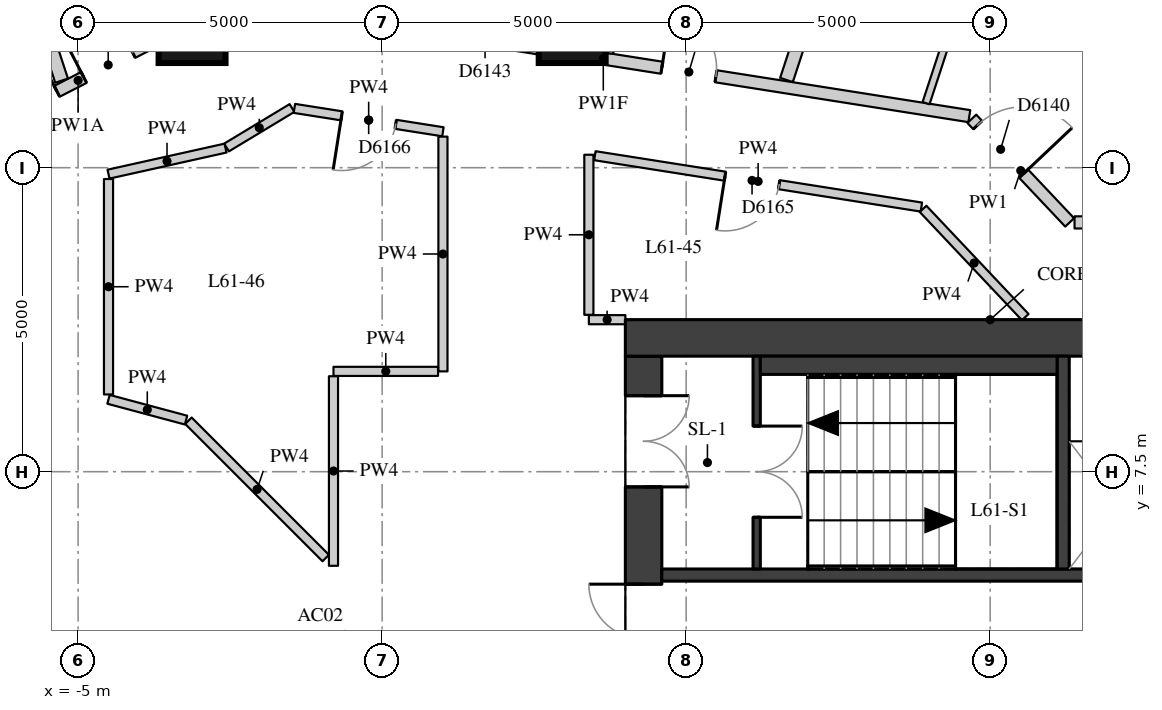
"""IFC4 building model, lengths in metres.
Left out: names, types, materials, properties, quantities, classifications, styles, units other than length and angle.
Written with IfcOpenShell. Run it as: python <this file> out.ifc"""

import sys

from ifc_helpers import new_model, si_unit, direction, frame, frame_2d, origin, origin_2d, place, context, subcontext, project, spatial, rectangle, extrude, element, fill, save


model = new_model("IFC4")
c1 = context("Model", 3, precision=1e-05, world=origin(), true_north=direction((0.0, 1.0)))
c2 = subcontext(c1, "Body", "Model", "MODEL_VIEW")
j1 = project(units=[si_unit("LENGTHUNIT", "METRE"), si_unit("PLANEANGLEUNIT", "RADIAN")], contexts=[c1])
p1 = place(None, origin())
s1 = spatial("IfcSite", under=j1, at=p1, CompositionType="ELEMENT")
p2 = place(p1, origin())
s2 = spatial("IfcBuilding", under=s1, at=p2, CompositionType="ELEMENT")
p3 = place(p2, frame((0.0, 0.0, 215.6)))
s3 = spatial("IfcBuildingStorey", under=s2, at=p3, CompositionType="ELEMENT", Elevation=215.6)
for number, where, z_axis, x_axis in (
    (1, (3.126, 14.772, 0.0), (0.0, 0.0, 1.0), (1.0, 0.0, 0.0)),
    (2, (-3.126, 14.772, 0.0), (0.0, 0.0, 1.0), (1.0, 0.0, 0.0)),
):
    element("IfcColumn", number, at=place(p3, frame(where, z_axis=z_axis, x_axis=x_axis)), inside=s3, PredefinedType="COLUMN", context=c2, shape_type="SweptSolid", body=[
        extrude(rectangle(XDim=1.1, YDim=1.1, at=origin_2d()), origin(), (0.0, 0.0, 1.0), 3.3),
    ])
p4 = place(p3, frame((4.3, -9.4, 0.0), z_axis=(0.0, 0.0, 1.0), x_axis=(0.0, 1.0, 0.0)))
e3 = element("IfcWall", 3, at=p4, inside=s3, PredefinedType="SHEAR", context=c2, shape_type="SweptSolid", body=[
    extrude(rectangle(XDim=18.8, YDim=0.6, at=frame_2d((9.4, 0.0))), origin(), (0.0, 0.0, 1.0), 3.02),
])
p5 = place(p4, frame((0.65, 0.0, 0.0)))
e4 = element("IfcOpeningElement", 4, at=p5, cuts=e3, PredefinedType="OPENING", context=c2, shape_type="SweptSolid", body=[
    extrude(rectangle(XDim=1.5, YDim=2.1, at=frame_2d((0.75, 1.05))), frame((0.0, 0.31, 0.0), z_axis=(0.0, -1.0, 0.0), x_axis=(1.0, 0.0, 0.0)), (0.0, 0.0, 1.0), 0.62),
])
p6 = place(p4, frame((3.75, 0.0, 0.0)))
e5 = element("IfcOpeningElement", 5, at=p6, cuts=e3, PredefinedType="OPENING", context=c2, shape_type="SweptSolid", body=[
    extrude(rectangle(XDim=1.8, YDim=2.1, at=frame_2d((0.9, 1.05))), frame((0.0, 0.31, 0.0), z_axis=(0.0, -1.0, 0.0), x_axis=(1.0, 0.0, 0.0)), (0.0, 0.0, 1.0), 0.62),
])
p7 = place(p4, frame((6.25, 0.0, 0.0)))
e6 = element("IfcOpeningElement", 6, at=p7, cuts=e3, PredefinedType="OPENING", context=c2, shape_type="SweptSolid", body=[
    extrude(rectangle(XDim=1.1, YDim=2.1, at=frame_2d((0.55, 1.05))), frame((0.0, 0.31, 0.0), z_axis=(0.0, -1.0, 0.0), x_axis=(1.0, 0.0, 0.0)), (0.0, 0.0, 1.0), 0.62),
])
p8 = place(p4, frame((8.9, 0.0, 0.0)))
e7 = element("IfcOpeningElement", 7, at=p8, cuts=e3, PredefinedType="OPENING", context=c2, shape_type="SweptSolid", body=[
    extrude(rectangle(XDim=1.0, YDim=2.1, at=frame_2d((0.5, 1.05))), frame((0.0, 0.31, 0.0), z_axis=(0.0, -1.0, 0.0), x_axis=(1.0, 0.0, 0.0)), (0.0, 0.0, 1.0), 0.62),
])
p9 = place(p4, frame((11.45, 0.0, 0.0)))
e8 = element("IfcOpeningElement", 8, at=p9, cuts=e3, PredefinedType="OPENING", context=c2, shape_type="SweptSolid", body=[
    extrude(rectangle(XDim=1.1, YDim=2.1, at=frame_2d((0.55, 1.05))), frame((0.0, 0.31, 0.0), z_axis=(0.0, -1.0, 0.0), x_axis=(1.0, 0.0, 0.0)), (0.0, 0.0, 1.0), 0.62),
])
p10 = place(p4, frame((13.25, 0.0, 0.0)))
e9 = element("IfcOpeningElement", 9, at=p10, cuts=e3, PredefinedType="OPENING", context=c2, shape_type="SweptSolid", body=[
    extrude(rectangle(XDim=1.8, YDim=2.1, at=frame_2d((0.9, 1.05))), frame((0.0, 0.31, 0.0), z_axis=(0.0, -1.0, 0.0), x_axis=(1.0, 0.0, 0.0)), (0.0, 0.0, 1.0), 0.62),
])
p11 = place(p4, frame((16.65, 0.0, 0.0)))
e10 = element("IfcOpeningElement", 10, at=p11, cuts=e3, PredefinedType="OPENING", context=c2, shape_type="SweptSolid", body=[
    extrude(rectangle(XDim=1.5, YDim=2.1, at=frame_2d((0.75, 1.05))), frame((0.0, 0.31, 0.0), z_axis=(0.0, -1.0, 0.0), x_axis=(1.0, 0.0, 0.0)), (0.0, 0.0, 1.0), 0.62),
])
p12 = place(p3, frame((4.0, 9.7, 0.0), z_axis=(0.0, 0.0, 1.0), x_axis=(1.0, 0.0, 0.0)))
e11 = element("IfcWall", 11, at=p12, inside=s3, PredefinedType="SHEAR", context=c2, shape_type="SweptSolid", body=[
    extrude(rectangle(XDim=12.0, YDim=0.6, at=frame_2d((6.0, 0.0))), origin(), (0.0, 0.0, 1.0), 3.02),
])
p13 = place(p3, frame((4.6, 5.8, 0.0), z_axis=(0.0, 0.0, 1.0), x_axis=(1.0, 0.0, 0.0)))
e12 = element("IfcWall", 12, at=p13, inside=s3, PredefinedType="SHEAR", context=c2, shape_type="SweptSolid", body=[
    extrude(rectangle(XDim=10.8, YDim=0.2, at=frame_2d((5.4, 0.0))), origin(), (0.0, 0.0, 1.0), 3.02),
])
p14 = place(p13, frame((7.05, 0.0, 0.0)))
e13 = element("IfcOpeningElement", 13, at=p14, cuts=e12, PredefinedType="OPENING", context=c2, shape_type="SweptSolid", body=[
    extrude(rectangle(XDim=1.1, YDim=2.1, at=frame_2d((0.55, 1.05))), frame((0.0, 0.11, 0.0), z_axis=(0.0, -1.0, 0.0), x_axis=(1.0, 0.0, 0.0)), (0.0, 0.0, 1.0), 0.22),
])
p15 = place(p13, frame((9.05, 0.0, 0.0)))
e14 = element("IfcOpeningElement", 14, at=p15, cuts=e12, PredefinedType="OPENING", context=c2, shape_type="SweptSolid", body=[
    extrude(rectangle(XDim=1.1, YDim=2.1, at=frame_2d((0.55, 1.05))), frame((0.0, 0.11, 0.0), z_axis=(0.0, -1.0, 0.0), x_axis=(1.0, 0.0, 0.0)), (0.0, 0.0, 1.0), 0.22),
])
p16 = place(p3, frame((11.2, 5.9, 0.0), z_axis=(0.0, 0.0, 1.0), x_axis=(0.0, 1.0, 0.0)))
e15 = element("IfcWall", 15, at=p16, inside=s3, PredefinedType="SHEAR", context=c2, shape_type="SweptSolid", body=[
    extrude(rectangle(XDim=3.5, YDim=0.2, at=frame_2d((1.75, 0.0))), origin(), (0.0, 0.0, 1.0), 3.02),
])
p17 = place(p3, frame((6.16, 5.9, 0.0), z_axis=(0.0, 0.0, 1.0), x_axis=(0.0, 1.0, 0.0)))
e16 = element("IfcWall", 16, at=p17, inside=s3, PredefinedType="SHEAR", context=c2, shape_type="SweptSolid", body=[
    extrude(rectangle(XDim=3.5, YDim=0.12, at=frame_2d((1.75, 0.0))), origin(), (0.0, 0.0, 1.0), 3.02),
])
p18 = place(p17, frame((0.85, 0.0, 0.0)))
e17 = element("IfcOpeningElement", 17, at=p18, cuts=e16, PredefinedType="OPENING", context=c2, shape_type="SweptSolid", body=[
    extrude(rectangle(XDim=1.5, YDim=2.1, at=frame_2d((0.75, 1.05))), frame((0.0, 0.07, 0.0), z_axis=(0.0, -1.0, 0.0), x_axis=(1.0, 0.0, 0.0)), (0.0, 0.0, 1.0), 0.14),
])
p19 = place(p3, frame((6.22, 9.25, 0.0), z_axis=(0.0, 0.0, 1.0), x_axis=(1.0, 0.0, 0.0)))
e18 = element("IfcWall", 18, at=p19, inside=s3, PredefinedType="PARTITIONING", context=c2, shape_type="SweptSolid", body=[
    extrude(rectangle(XDim=4.88, YDim=0.3, at=frame_2d((2.44, 0.0))), origin(), (0.0, 0.0, 1.0), 3.02),
])
p20 = place(p3, frame((-7.557, 12.619, 0.0), z_axis=(0.0, 0.0, 1.0), x_axis=(0.889086035914, 0.457740123588, 0.0)))
e19 = element("IfcWall", 19, at=p20, inside=s3, PredefinedType="PARTITIONING", context=c2, shape_type="SweptSolid", body=[
    extrude(rectangle(XDim=5.753, YDim=0.2, at=frame_2d((2.877, 0.0))), origin(), (0.0, 0.0, 1.0), 2.57),
])
p21 = place(p20, frame((2.983, 0.0, 0.0)))
e20 = element("IfcOpeningElement", 20, at=p21, cuts=e19, PredefinedType="OPENING", context=c2, shape_type="SweptSolid", body=[
    extrude(rectangle(XDim=0.9, YDim=2.1, at=frame_2d((0.45, 1.05))), frame((0.0, 0.11, 0.0), z_axis=(0.0, -1.0, 0.0), x_axis=(1.0, 0.0, 0.0)), (0.0, 0.0, 1.0), 0.22),
])
p22 = place(p20, frame((0.685, 0.0, 0.0)))
e21 = element("IfcOpeningElement", 21, at=p22, cuts=e19, PredefinedType="OPENING", context=c2, shape_type="SweptSolid", body=[
    extrude(rectangle(XDim=1.8, YDim=2.1, at=frame_2d((0.9, 1.05))), frame((0.0, 0.11, 0.0), z_axis=(0.0, -1.0, 0.0), x_axis=(1.0, 0.0, 0.0)), (0.0, 0.0, 1.0), 0.22),
])
p23 = place(p3, frame((-2.383, 15.243, 0.0), z_axis=(0.0, 0.0, 1.0), x_axis=(0.987842256944, -0.15545956193, 0.0)))
e22 = element("IfcWall", 22, at=p23, inside=s3, PredefinedType="PARTITIONING", context=c2, shape_type="SweptSolid", body=[
    extrude(rectangle(XDim=12.188, YDim=0.2, at=frame_2d((6.094, 0.0))), origin(), (0.0, 0.0, 1.0), 2.42),
])
p24 = place(p23, frame((7.069, 0.0, 0.0)))
e23 = element("IfcOpeningElement", 23, at=p24, cuts=e22, PredefinedType="OPENING", context=c2, shape_type="SweptSolid", body=[
    extrude(rectangle(XDim=0.9, YDim=2.1, at=frame_2d((0.45, 1.05))), frame((0.0, 0.11, 0.0), z_axis=(0.0, -1.0, 0.0), x_axis=(1.0, 0.0, 0.0)), (0.0, 0.0, 1.0), 0.22),
])
p25 = place(p23, frame((3.676, 0.0, 0.0)))
e24 = element("IfcOpeningElement", 24, at=p25, cuts=e22, PredefinedType="OPENING", context=c2, shape_type="SweptSolid", body=[
    extrude(rectangle(XDim=0.9, YDim=2.1, at=frame_2d((0.45, 1.05))), frame((0.0, 0.11, 0.0), z_axis=(0.0, -1.0, 0.0), x_axis=(1.0, 0.0, 0.0)), (0.0, 0.0, 1.0), 0.22),
])
p26 = place(p23, frame((1.875, 0.0, 0.0)))
e25 = element("IfcOpeningElement", 25, at=p26, cuts=e22, PredefinedType="OPENING", context=c2, shape_type="SweptSolid", body=[
    extrude(rectangle(XDim=0.9, YDim=2.1, at=frame_2d((0.45, 1.05))), frame((0.0, 0.11, 0.0), z_axis=(0.0, -1.0, 0.0), x_axis=(1.0, 0.0, 0.0)), (0.0, 0.0, 1.0), 0.22),
])
p27 = place(p3, frame((9.698, 13.304, 0.0), z_axis=(0.0, 0.0, 1.0), x_axis=(0.686553169295, -0.727079600684, 0.0)))
e26 = element("IfcWall", 26, at=p27, inside=s3, PredefinedType="PARTITIONING", context=c2, shape_type="SweptSolid", body=[
    extrude(rectangle(XDim=2.344, YDim=0.2, at=frame_2d((1.172, 0.0))), origin(), (0.0, 0.0, 1.0), 3.02),
])
p28 = place(p27, frame((0.14, 0.0, 0.0)))
e27 = element("IfcOpeningElement", 27, at=p28, cuts=e26, PredefinedType="OPENING", context=c2, shape_type="SweptSolid", body=[
    extrude(rectangle(XDim=1.1, YDim=2.1, at=frame_2d((0.55, 1.05))), frame((0.0, 0.11, 0.0), z_axis=(0.0, -1.0, 0.0), x_axis=(1.0, 0.0, 0.0)), (0.0, 0.0, 1.0), 0.22),
])
p29 = place(p3, frame((11.387, 11.6, 0.0), z_axis=(0.0, 0.0, 1.0), x_axis=(1.0, 0.0, 0.0)))
e28 = element("IfcWall", 28, at=p29, inside=s3, PredefinedType="PARTITIONING", context=c2, shape_type="SweptSolid", body=[
    extrude(rectangle(XDim=6.213, YDim=0.2, at=frame_2d((3.106, 0.0))), origin(), (0.0, 0.0, 1.0), 3.02),
])
p30 = place(p3, frame((4.001, 10.0, 0.0), z_axis=(0.0, 0.0, 1.0), x_axis=(-1.0, 0.0, 0.0)))
e29 = element("IfcWall", 29, at=p30, inside=s3, PredefinedType="PARTITIONING", context=c2, shape_type="SweptSolid", body=[
    extrude(rectangle(XDim=0.601, YDim=0.15, at=frame_2d((0.301, 0.0))), origin(), (0.0, 0.0, 1.0), 3.02),
])
p31 = place(p3, frame((3.4, 10.08, 0.0), z_axis=(0.0, 0.0, 1.0), x_axis=(0.0, 1.0, 0.0)))
e30 = element("IfcWall", 30, at=p31, inside=s3, PredefinedType="PARTITIONING", context=c2, shape_type="SweptSolid", body=[
    extrude(rectangle(XDim=2.633, YDim=0.15, at=frame_2d((1.316, 0.0))), origin(), (0.0, 0.0, 1.0), 3.02),
])
p32 = place(p3, frame((3.499, 12.697, 0.0), z_axis=(0.0, 0.0, 1.0), x_axis=(0.987853106423, -0.155390605029, 0.0)))
e31 = element("IfcWall", 31, at=p32, inside=s3, PredefinedType="PARTITIONING", context=c2, shape_type="SweptSolid", body=[
    extrude(rectangle(XDim=5.436, YDim=0.15, at=frame_2d((2.718, 0.0))), origin(), (0.0, 0.0, 1.0), 3.02),
])
p33 = place(p32, frame((2.167, 0.0, 0.0)))
e32 = element("IfcOpeningElement", 32, at=p33, cuts=e31, PredefinedType="OPENING", context=c2, shape_type="SweptSolid", body=[
    extrude(rectangle(XDim=0.9, YDim=2.1, at=frame_2d((0.45, 1.05))), frame((0.0, 0.085, 0.0), z_axis=(0.0, -1.0, 0.0), x_axis=(1.0, 0.0, 0.0)), (0.0, 0.0, 1.0), 0.17),
])
p34 = place(p3, frame((8.896, 11.823, 0.0), z_axis=(0.0, 0.0, 1.0), x_axis=(0.686471254033, -0.727156941373, 0.0)))
e33 = element("IfcWall", 33, at=p34, inside=s3, PredefinedType="PARTITIONING", context=c2, shape_type="SweptSolid", body=[
    extrude(rectangle(XDim=2.448, YDim=0.15, at=frame_2d((1.224, 0.0))), origin(), (0.0, 0.0, 1.0), 3.02),
])
p35 = place(p3, frame((-4.5, 12.394, 0.0), z_axis=(0.0, 0.0, 1.0), x_axis=(0.976122911094, 0.217218927437, 0.0)))
e34 = element("IfcWall", 34, at=p35, inside=s3, PredefinedType="PARTITIONING", context=c2, shape_type="SweptSolid", body=[
    extrude(rectangle(XDim=1.971, YDim=0.15, at=frame_2d((0.986, 0.0))), origin(), (0.0, 0.0, 1.0), 3.02),
])
p36 = place(p3, frame((-2.559, 12.832, 0.0), z_axis=(0.0, 0.0, 1.0), x_axis=(0.85627358004, 0.5165225611, 0.0)))
e35 = element("IfcWall", 35, at=p36, inside=s3, PredefinedType="PARTITIONING", context=c2, shape_type="SweptSolid", body=[
    extrude(rectangle(XDim=1.257, YDim=0.15, at=frame_2d((0.628, 0.0))), origin(), (0.0, 0.0, 1.0), 3.02),
])
p37 = place(p3, frame((-1.443, 13.475, 0.0), z_axis=(0.0, 0.0, 1.0), x_axis=(0.987852456019, -0.155394739734, 0.0)))
e36 = element("IfcWall", 36, at=p37, inside=s3, PredefinedType="PARTITIONING", context=c2, shape_type="SweptSolid", body=[
    extrude(rectangle(XDim=2.473, YDim=0.15, at=frame_2d((1.236, 0.0))), origin(), (0.0, 0.0, 1.0), 3.02),
])
p38 = place(p37, frame((0.786, 0.0, 0.0)))
e37 = element("IfcOpeningElement", 37, at=p38, cuts=e36, PredefinedType="OPENING", context=c2, shape_type="SweptSolid", body=[
    extrude(rectangle(XDim=0.9, YDim=2.1, at=frame_2d((0.45, 1.05))), frame((0.0, 0.085, 0.0), z_axis=(0.0, -1.0, 0.0), x_axis=(1.0, 0.0, 0.0)), (0.0, 0.0, 1.0), 0.17),
])
p39 = place(p3, frame((1.0, 13.011, 0.0), z_axis=(0.0, 0.0, 1.0), x_axis=(0.0, -1.0, 0.0)))
e38 = element("IfcWall", 38, at=p39, inside=s3, PredefinedType="PARTITIONING", context=c2, shape_type="SweptSolid", body=[
    extrude(rectangle(XDim=3.861, YDim=0.15, at=frame_2d((1.93, 0.0))), origin(), (0.0, 0.0, 1.0), 3.02),
])
p40 = place(p3, frame((0.92, 9.15, 0.0), z_axis=(0.0, 0.0, 1.0), x_axis=(-1.0, 0.0, 0.0)))
e39 = element("IfcWall", 39, at=p40, inside=s3, PredefinedType="PARTITIONING", context=c2, shape_type="SweptSolid", body=[
    extrude(rectangle(XDim=1.72, YDim=0.15, at=frame_2d((0.86, 0.0))), origin(), (0.0, 0.0, 1.0), 3.02),
])
p41 = place(p3, frame((-0.8, 9.07, 0.0), z_axis=(0.0, 0.0, 1.0), x_axis=(0.0, -1.0, 0.0)))
e40 = element("IfcWall", 40, at=p41, inside=s3, PredefinedType="PARTITIONING", context=c2, shape_type="SweptSolid", body=[
    extrude(rectangle(XDim=3.118, YDim=0.15, at=frame_2d((1.559, 0.0))), origin(), (0.0, 0.0, 1.0), 3.02),
])
p42 = place(p3, frame((-0.927, 6.08, 0.0), z_axis=(0.0, 0.0, 1.0), x_axis=(-0.707106781187, 0.707106781187, 0.0)))
e41 = element("IfcWall", 41, at=p42, inside=s3, PredefinedType="PARTITIONING", context=c2, shape_type="SweptSolid", body=[
    extrude(rectangle(XDim=3.194, YDim=0.15, at=frame_2d((1.597, 0.0))), origin(), (0.0, 0.0, 1.0), 3.02),
])
p43 = place(p3, frame((-3.225, 8.348, 0.0), z_axis=(0.0, 0.0, 1.0), x_axis=(-0.965915035697, 0.258859312783, 0.0)))
e42 = element("IfcWall", 42, at=p43, inside=s3, PredefinedType="PARTITIONING", context=c2, shape_type="SweptSolid", body=[
    extrude(rectangle(XDim=1.32, YDim=0.15, at=frame_2d((0.66, 0.0))), origin(), (0.0, 0.0, 1.0), 3.02),
])
p44 = place(p3, frame((-4.5, 8.77, 0.0), z_axis=(0.0, 0.0, 1.0), x_axis=(0.0, 1.0, 0.0)))
e43 = element("IfcWall", 43, at=p44, inside=s3, PredefinedType="PARTITIONING", context=c2, shape_type="SweptSolid", body=[
    extrude(rectangle(XDim=3.543, YDim=0.15, at=frame_2d((1.772, 0.0))), origin(), (0.0, 0.0, 1.0), 3.02),
])
p45 = place(p3, frame((9.307, 22.035, 0.0), z_axis=(0.0, 0.0, 1.0), x_axis=(-0.311959631661, -0.950095357432, 0.0)))
e44 = element("IfcWall", 44, at=p45, inside=s3, PredefinedType="PARTITIONING", context=c2, shape_type="SweptSolid", body=[
    extrude(rectangle(XDim=8.518, YDim=0.22, at=frame_2d((4.259, 0.0))), origin(), (0.0, 0.0, 1.0), 3.02),
])
p46 = place(p3, frame((5.071, 23.056, 0.0), z_axis=(0.0, 0.0, 1.0), x_axis=(-0.157127996446, -0.987578246385, 0.0)))
e45 = element("IfcWall", 45, at=p46, inside=s3, PredefinedType="PARTITIONING", context=c2, shape_type="SweptSolid", body=[
    extrude(rectangle(XDim=8.777, YDim=0.22, at=frame_2d((4.389, 0.0))), origin(), (0.0, 0.0, 1.0), 2.47),
])
p47 = place(p3, frame((-7.508, 20.743, 0.0), z_axis=(0.0, 0.0, 1.0), x_axis=(0.31199567476, -0.950083522082, 0.0)))
e46 = element("IfcWall", 46, at=p47, inside=s3, PredefinedType="PARTITIONING", context=c2, shape_type="SweptSolid", body=[
    extrude(rectangle(XDim=7.17, YDim=0.22, at=frame_2d((3.585, 0.0))), origin(), (0.0, 0.0, 1.0), 3.02),
])
p48 = place(p3, frame((8.945, 13.561, 0.0), z_axis=(0.0, 0.0, 1.0), x_axis=(0.311960021399, 0.950095229463, 0.0)))
e47 = element("IfcWall", 47, at=p48, inside=s3, PredefinedType="PARTITIONING", context=c2, shape_type="SweptSolid", body=[
    extrude(rectangle(XDim=2.525, YDim=0.12, at=frame_2d((1.262, 0.0))), origin(), (0.0, 0.0, 1.0), 3.02),
])
p49 = place(p3, frame((-8.0, 5.554, 0.0), z_axis=(0.0, 0.0, 1.0), x_axis=(0.923860025149, -0.382730523909, 0.0)))
e48 = element("IfcWall", 48, at=p49, inside=s3, PredefinedType="PARTITIONING", context=c2, shape_type="SweptSolid", body=[
    extrude(rectangle(XDim=4.251, YDim=0.1, at=frame_2d((2.125, 0.0))), origin(), (0.0, 0.0, 1.0), 3.02),
])
p50 = place(p10, origin())
e49 = element("IfcDoor", 49, at=p50, inside=s3, OperationType="DOUBLE_DOOR_SINGLE_SWING", PredefinedType="DOOR", context=c2, shape_type="SweptSolid", body=[
    extrude(rectangle(XDim=1.8, YDim=2.1, at=frame_2d((0.9, 1.05))), frame((0.0, 0.025, 0.0), z_axis=(0.0, -1.0, 0.0), x_axis=(1.0, 0.0, 0.0)), (0.0, 0.0, 1.0), 0.05),
])
fill(e9, e49)
p51 = place(p11, origin())
e50 = element("IfcDoor", 50, at=p51, inside=s3, OperationType="DOUBLE_DOOR_SINGLE_SWING", PredefinedType="DOOR", context=c2, shape_type="SweptSolid", body=[
    extrude(rectangle(XDim=1.5, YDim=2.1, at=frame_2d((0.75, 1.05))), frame((0.0, 0.025, 0.0), z_axis=(0.0, -1.0, 0.0), x_axis=(1.0, 0.0, 0.0)), (0.0, 0.0, 1.0), 0.05),
])
fill(e10, e50)
p52 = place(p18, origin())
e51 = element("IfcDoor", 51, at=p52, inside=s3, OperationType="DOUBLE_DOOR_SINGLE_SWING", PredefinedType="DOOR", context=c2, shape_type="SweptSolid", body=[
    extrude(rectangle(XDim=1.5, YDim=2.1, at=frame_2d((0.75, 1.05))), frame((0.0, 0.025, 0.0), z_axis=(0.0, -1.0, 0.0), x_axis=(1.0, 0.0, 0.0)), (0.0, 0.0, 1.0), 0.05),
])
fill(e17, e51)
p53 = place(p28, origin())
e52 = element("IfcDoor", 52, at=p53, inside=s3, OperationType="SINGLE_SWING_RIGHT", PredefinedType="DOOR", context=c2, shape_type="SweptSolid", body=[
    extrude(rectangle(XDim=1.1, YDim=2.1, at=frame_2d((0.55, 1.05))), frame((0.0, 0.025, 0.0), z_axis=(0.0, -1.0, 0.0), x_axis=(1.0, 0.0, 0.0)), (0.0, 0.0, 1.0), 0.05),
])
fill(e27, e52)
p54 = place(p24, origin())
e53 = element("IfcDoor", 53, at=p54, inside=s3, OperationType="SINGLE_SWING_LEFT", PredefinedType="DOOR", context=c2, shape_type="SweptSolid", body=[
    extrude(rectangle(XDim=0.9, YDim=2.1, at=frame_2d((0.45, 1.05))), frame((0.0, 0.025, 0.0), z_axis=(0.0, -1.0, 0.0), x_axis=(1.0, 0.0, 0.0)), (0.0, 0.0, 1.0), 0.05),
])
fill(e23, e53)
p55 = place(p21, origin())
e54 = element("IfcDoor", 54, at=p55, inside=s3, OperationType="SINGLE_SWING_LEFT", PredefinedType="DOOR", context=c2, shape_type="SweptSolid", body=[
    extrude(rectangle(XDim=0.9, YDim=2.1, at=frame_2d((0.45, 1.05))), frame((0.0, 0.025, 0.0), z_axis=(0.0, -1.0, 0.0), x_axis=(1.0, 0.0, 0.0)), (0.0, 0.0, 1.0), 0.05),
])
fill(e20, e54)
p56 = place(p22, origin())
e55 = element("IfcDoor", 55, at=p56, inside=s3, OperationType="DOUBLE_DOOR_SINGLE_SWING", PredefinedType="DOOR", context=c2, shape_type="SweptSolid", body=[
    extrude(rectangle(XDim=1.8, YDim=2.1, at=frame_2d((0.9, 1.05))), frame((0.0, 0.025, 0.0), z_axis=(0.0, -1.0, 0.0), x_axis=(1.0, 0.0, 0.0)), (0.0, 0.0, 1.0), 0.05),
])
fill(e21, e55)
p57 = place(p33, origin())
e56 = element("IfcDoor", 56, at=p57, inside=s3, OperationType="SINGLE_SWING_RIGHT", PredefinedType="DOOR", context=c2, shape_type="SweptSolid", body=[
    extrude(rectangle(XDim=0.9, YDim=2.1, at=frame_2d((0.45, 1.05))), frame((0.0, 0.025, 0.0), z_axis=(0.0, -1.0, 0.0), x_axis=(1.0, 0.0, 0.0)), (0.0, 0.0, 1.0), 0.05),
])
fill(e32, e56)
p58 = place(p38, origin())
e57 = element("IfcDoor", 57, at=p58, inside=s3, OperationType="SINGLE_SWING_RIGHT", PredefinedType="DOOR", context=c2, shape_type="SweptSolid", body=[
    extrude(rectangle(XDim=0.9, YDim=2.1, at=frame_2d((0.45, 1.05))), frame((0.0, 0.025, 0.0), z_axis=(0.0, -1.0, 0.0), x_axis=(1.0, 0.0, 0.0)), (0.0, 0.0, 1.0), 0.05),
])
fill(e37, e57)
save(model, sys.argv[1])
